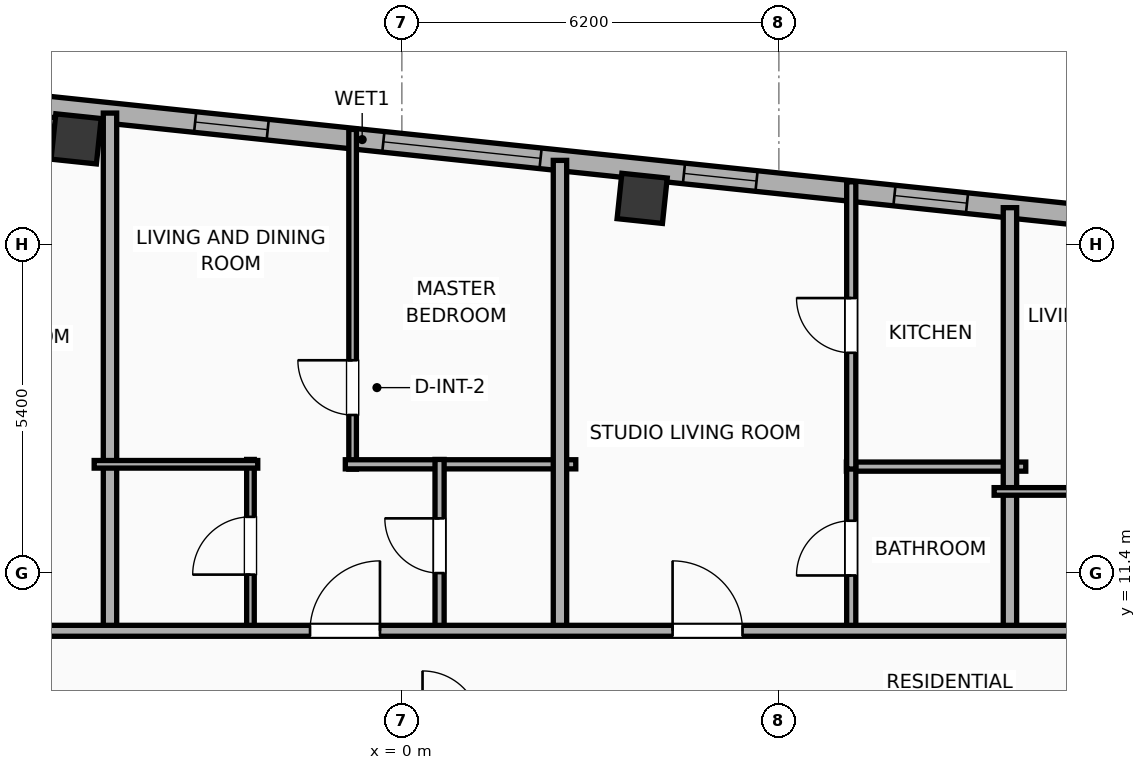
"""IFC4 building model, lengths in metres.
Left out: names, types, materials, properties, quantities, classifications, styles, units other than length and angle.
Written with IfcOpenShell. Run it as: python <this file> out.ifc"""

import sys

from ifc_helpers import new_model, si_unit, direction, frame, frame_2d, origin, origin_2d, place, context, subcontext, project, spatial, rectangle, hollow_rectangle, extrude, element, fill, save


model = new_model("IFC4")
c1 = context("Model", 3, precision=1e-05, world=origin(), true_north=direction((0.0, 1.0)))
c2 = subcontext(c1, "Body", "Model", "MODEL_VIEW")
j1 = project(units=[si_unit("LENGTHUNIT", "METRE"), si_unit("PLANEANGLEUNIT", "RADIAN")], contexts=[c1])
p1 = place(None, origin())
s1 = spatial("IfcSite", under=j1, at=p1, CompositionType="ELEMENT")
p2 = place(p1, origin())
s2 = spatial("IfcBuilding", under=s1, at=p2, CompositionType="ELEMENT")
p3 = place(p2, frame((0.0, 0.0, 306.8)))
s3 = spatial("IfcBuildingStorey", under=s2, at=p3, CompositionType="ELEMENT", Elevation=306.8)
for number, where, z_axis, x_axis in (
    (1, (3.952, 17.561, 0.0), (0.0, 0.0, 1.0), (0.995, -0.105, 0.0)),
    (2, (-5.357, 18.54, 0.0), (0.0, 0.0, 1.0), (0.995, -0.105, 0.0)),
):
    element("IfcColumn", number, at=place(p3, frame(where, z_axis=z_axis, x_axis=x_axis)), inside=s3, PredefinedType="COLUMN", context=c2, shape_type="SweptSolid", body=[
        extrude(hollow_rectangle(XDim=0.75, YDim=0.75, WallThickness=0.025, at=origin_2d()), origin(), (0.0, 0.0, 1.0), 3.865),
    ])
p4 = place(p3, frame((-23.908, 20.972, 0.0), z_axis=(0.0, 0.0, 1.0), x_axis=(0.994521888554, -0.104528528102, 0.0)))
e3 = element("IfcWall", 3, at=p4, inside=s3, PredefinedType="ELEMENTEDWALL", context=c2, shape_type="SweptSolid", body=[
    extrude(rectangle(XDim=46.766, YDim=0.34, at=frame_2d((23.383, 0.0))), origin(), (0.0, 0.0, 1.0), 2.39),
])
p5 = place(p4, frame((23.733, 0.0, 0.65)))
e4 = element("IfcOpeningElement", 4, at=p5, cuts=e3, PredefinedType="OPENING", context=c2, shape_type="SweptSolid", body=[
    extrude(rectangle(XDim=2.6, YDim=1.45, at=frame_2d((1.3, 0.725))), frame((0.0, 0.18, 0.0), z_axis=(0.0, -1.0, 0.0), x_axis=(1.0, 0.0, 0.0)), (0.0, 0.0, 1.0), 0.36),
])
p6 = place(p4, frame((38.522, 0.0, 0.65)))
e5 = element("IfcOpeningElement", 5, at=p6, cuts=e3, PredefinedType="OPENING", context=c2, shape_type="SweptSolid", body=[
    extrude(rectangle(XDim=2.6, YDim=1.45, at=frame_2d((1.3, 0.725))), frame((0.0, 0.18, 0.0), z_axis=(0.0, -1.0, 0.0), x_axis=(1.0, 0.0, 0.0)), (0.0, 0.0, 1.0), 0.36),
])
p7 = place(p4, frame((2.019, 0.0, 0.55)))
e6 = element("IfcOpeningElement", 6, at=p7, cuts=e3, PredefinedType="OPENING", context=c2, shape_type="SweptSolid", body=[
    extrude(rectangle(XDim=1.2, YDim=1.15, at=frame_2d((0.6, 0.575))), frame((0.0, 0.18, 0.0), z_axis=(0.0, -1.0, 0.0), x_axis=(1.0, 0.0, 0.0)), (0.0, 0.0, 1.0), 0.36),
])
p8 = place(p4, frame((9.966, 0.0, 0.55)))
e7 = element("IfcOpeningElement", 7, at=p8, cuts=e3, PredefinedType="OPENING", context=c2, shape_type="SweptSolid", body=[
    extrude(rectangle(XDim=1.2, YDim=1.15, at=frame_2d((0.6, 0.575))), frame((0.0, 0.18, 0.0), z_axis=(0.0, -1.0, 0.0), x_axis=(1.0, 0.0, 0.0)), (0.0, 0.0, 1.0), 0.36),
])
p9 = place(p4, frame((5.046, 0.0, 0.55)))
e8 = element("IfcOpeningElement", 8, at=p9, cuts=e3, PredefinedType="OPENING", context=c2, shape_type="SweptSolid", body=[
    extrude(rectangle(XDim=1.2, YDim=1.15, at=frame_2d((0.6, 0.575))), frame((0.0, 0.18, 0.0), z_axis=(0.0, -1.0, 0.0), x_axis=(1.0, 0.0, 0.0)), (0.0, 0.0, 1.0), 0.36),
])
p10 = place(p4, frame((16.207, 0.0, 0.55)))
e9 = element("IfcOpeningElement", 9, at=p10, cuts=e3, PredefinedType="OPENING", context=c2, shape_type="SweptSolid", body=[
    extrude(rectangle(XDim=1.2, YDim=1.15, at=frame_2d((0.6, 0.575))), frame((0.0, 0.18, 0.0), z_axis=(0.0, -1.0, 0.0), x_axis=(1.0, 0.0, 0.0)), (0.0, 0.0, 1.0), 0.36),
])
p11 = place(p4, frame((12.487, 0.0, 0.55)))
e10 = element("IfcOpeningElement", 10, at=p11, cuts=e3, PredefinedType="OPENING", context=c2, shape_type="SweptSolid", body=[
    extrude(rectangle(XDim=1.2, YDim=1.15, at=frame_2d((0.6, 0.575))), frame((0.0, 0.18, 0.0), z_axis=(0.0, -1.0, 0.0), x_axis=(1.0, 0.0, 0.0)), (0.0, 0.0, 1.0), 0.36),
])
p12 = place(p4, frame((20.621, 0.0, 0.55)))
e11 = element("IfcOpeningElement", 11, at=p12, cuts=e3, PredefinedType="OPENING", context=c2, shape_type="SweptSolid", body=[
    extrude(rectangle(XDim=1.2, YDim=1.15, at=frame_2d((0.6, 0.575))), frame((0.0, 0.18, 0.0), z_axis=(0.0, -1.0, 0.0), x_axis=(1.0, 0.0, 0.0)), (0.0, 0.0, 1.0), 0.36),
])
p13 = place(p4, frame((28.704, 0.0, 0.55)))
e12 = element("IfcOpeningElement", 12, at=p13, cuts=e3, PredefinedType="OPENING", context=c2, shape_type="SweptSolid", body=[
    extrude(rectangle(XDim=1.2, YDim=1.15, at=frame_2d((0.6, 0.575))), frame((0.0, 0.18, 0.0), z_axis=(0.0, -1.0, 0.0), x_axis=(1.0, 0.0, 0.0)), (0.0, 0.0, 1.0), 0.36),
])
p14 = place(p4, frame((32.185, 0.0, 0.55)))
e13 = element("IfcOpeningElement", 13, at=p14, cuts=e3, PredefinedType="OPENING", context=c2, shape_type="SweptSolid", body=[
    extrude(rectangle(XDim=1.2, YDim=1.15, at=frame_2d((0.6, 0.575))), frame((0.0, 0.18, 0.0), z_axis=(0.0, -1.0, 0.0), x_axis=(1.0, 0.0, 0.0)), (0.0, 0.0, 1.0), 0.36),
])
p15 = place(p4, frame((35.503, 0.0, 0.55)))
e14 = element("IfcOpeningElement", 14, at=p15, cuts=e3, PredefinedType="OPENING", context=c2, shape_type="SweptSolid", body=[
    extrude(rectangle(XDim=1.2, YDim=1.15, at=frame_2d((0.6, 0.575))), frame((0.0, 0.18, 0.0), z_axis=(0.0, -1.0, 0.0), x_axis=(1.0, 0.0, 0.0)), (0.0, 0.0, 1.0), 0.36),
])
p16 = place(p4, frame((43.106, 0.0, 0.55)))
e15 = element("IfcOpeningElement", 15, at=p16, cuts=e3, PredefinedType="OPENING", context=c2, shape_type="SweptSolid", body=[
    extrude(rectangle(XDim=1.2, YDim=1.15, at=frame_2d((0.6, 0.575))), frame((0.0, 0.18, 0.0), z_axis=(0.0, -1.0, 0.0), x_axis=(1.0, 0.0, 0.0)), (0.0, 0.0, 1.0), 0.36),
])
p17 = place(p3, frame((-4.8, 10.37, 0.0), z_axis=(0.0, 0.0, 1.0), x_axis=(0.0, 1.0, 0.0)))
e16 = element("IfcWall", 16, at=p17, inside=s3, PredefinedType="PARTITIONING", context=c2, shape_type="SweptSolid", body=[
    extrude(rectangle(XDim=8.594, YDim=0.22, at=frame_2d((4.297, 0.0))), origin(), (0.0, 0.0, 1.0), 2.39),
])
p18 = place(p3, frame((-0.81, 13.108, 0.0), z_axis=(0.0, 0.0, 1.0), x_axis=(0.0, 1.0, 0.0)))
e17 = element("IfcWall", 17, at=p18, inside=s3, PredefinedType="PARTITIONING", context=c2, shape_type="SweptSolid", body=[
    extrude(rectangle(XDim=5.587, YDim=0.125, at=frame_2d((2.794, 0.0))), origin(), (0.0, 0.0, 1.0), 3.5),
])
p19 = place(p18, frame((0.891, 0.0, 0.0)))
e18 = element("IfcOpeningElement", 18, at=p19, cuts=e17, PredefinedType="OPENING", context=c2, shape_type="SweptSolid", body=[
    extrude(rectangle(XDim=0.9, YDim=2.05, at=frame_2d((0.45, 1.025))), frame((0.0, 0.073, 0.0), z_axis=(0.0, -1.0, 0.0), x_axis=(1.0, 0.0, 0.0)), (0.0, 0.0, 1.0), 0.145),
])
p20 = place(p3, frame((-0.93, 13.188, 0.0), z_axis=(0.0, 0.0, 1.0), x_axis=(1.0, 0.0, 0.0)))
e19 = element("IfcWall", 19, at=p20, inside=s3, PredefinedType="PLUMBINGWALL", context=c2, shape_type="SweptSolid", body=[
    extrude(rectangle(XDim=3.79, YDim=0.15, at=frame_2d((1.895, 0.0))), origin(), (0.0, 0.0, 1.0), 3.5),
])
p21 = place(p3, frame((-2.49, 10.43, 0.0), z_axis=(0.0, 0.0, 1.0), x_axis=(0.0, 1.0, 0.0)))
e20 = element("IfcWall", 20, at=p21, inside=s3, PredefinedType="PARTITIONING", context=c2, shape_type="SweptSolid", body=[
    extrude(rectangle(XDim=2.838, YDim=0.125, at=frame_2d((1.419, 0.0))), origin(), (0.0, 0.0, 1.0), 3.5),
])
p22 = place(p21, frame((0.944, 0.0, 0.0)))
e21 = element("IfcOpeningElement", 21, at=p22, cuts=e20, PredefinedType="OPENING", context=c2, shape_type="SweptSolid", body=[
    extrude(rectangle(XDim=0.95, YDim=2.05, at=frame_2d((0.475, 1.025))), frame((0.0, 0.073, 0.0), z_axis=(0.0, -1.0, 0.0), x_axis=(1.0, 0.0, 0.0)), (0.0, 0.0, 1.0), 0.145),
])
p23 = place(p3, frame((-5.06, 13.188, 0.0), z_axis=(0.0, 0.0, 1.0), x_axis=(1.0, 0.0, 0.0)))
e22 = element("IfcWall", 22, at=p23, inside=s3, PredefinedType="PARTITIONING", context=c2, shape_type="SweptSolid", body=[
    extrude(rectangle(XDim=2.69, YDim=0.125, at=frame_2d((1.345, 0.0))), origin(), (0.0, 0.0, 1.0), 3.5),
])
p24 = place(p3, frame((0.62, 10.43, 0.0), z_axis=(0.0, 0.0, 1.0), x_axis=(0.0, 1.0, 0.0)))
e23 = element("IfcWall", 23, at=p24, inside=s3, PredefinedType="PLUMBINGWALL", context=c2, shape_type="SweptSolid", body=[
    extrude(rectangle(XDim=2.838, YDim=0.15, at=frame_2d((1.419, 0.0))), origin(), (0.0, 0.0, 1.0), 3.5),
])
p25 = place(p24, frame((0.969, 0.0, 0.0)))
e24 = element("IfcOpeningElement", 24, at=p25, cuts=e23, PredefinedType="OPENING", context=c2, shape_type="SweptSolid", body=[
    extrude(rectangle(XDim=0.9, YDim=2.05, at=frame_2d((0.45, 1.025))), frame((0.0, 0.085, 0.0), z_axis=(0.0, -1.0, 0.0), x_axis=(1.0, 0.0, 0.0)), (0.0, 0.0, 1.0), 0.17),
])
p26 = place(p3, frame((2.6, 10.37, 0.0), z_axis=(0.0, 0.0, 1.0), x_axis=(0.0, 1.0, 0.0)))
e25 = element("IfcWall", 25, at=p26, inside=s3, PredefinedType="PARTITIONING", context=c2, shape_type="SweptSolid", body=[
    extrude(rectangle(XDim=7.816, YDim=0.22, at=frame_2d((3.908, 0.0))), origin(), (0.0, 0.0, 1.0), 3.5),
])
p27 = place(p3, frame((7.31, 13.15, 0.0), z_axis=(0.0, 0.0, 1.0), x_axis=(1.0, 0.0, 0.0)))
e26 = element("IfcWall", 26, at=p27, inside=s3, PredefinedType="PLUMBINGWALL", context=c2, shape_type="SweptSolid", body=[
    extrude(rectangle(XDim=2.95, YDim=0.15, at=frame_2d((1.475, 0.0))), origin(), (0.0, 0.0, 1.0), 3.5),
])
p28 = place(p3, frame((7.39, 10.43, 0.0), z_axis=(0.0, 0.0, 1.0), x_axis=(0.0, 1.0, 0.0)))
e27 = element("IfcWall", 27, at=p28, inside=s3, PredefinedType="PLUMBINGWALL", context=c2, shape_type="SweptSolid", body=[
    extrude(rectangle(XDim=2.76, YDim=0.15, at=frame_2d((1.38, 0.0))), origin(), (0.0, 0.0, 1.0), 3.5),
])
p29 = place(p28, frame((0.93, 0.0, 0.0)))
e28 = element("IfcOpeningElement", 28, at=p29, cuts=e27, PredefinedType="OPENING", context=c2, shape_type="SweptSolid", body=[
    extrude(rectangle(XDim=0.9, YDim=2.05, at=frame_2d((0.45, 1.025))), frame((0.0, 0.085, 0.0), z_axis=(0.0, -1.0, 0.0), x_axis=(1.0, 0.0, 0.0)), (0.0, 0.0, 1.0), 0.17),
])
p30 = place(p3, frame((7.39, 13.11, 0.0), z_axis=(0.0, 0.0, 1.0), x_axis=(0.0, 1.0, 0.0)))
e29 = element("IfcWall", 29, at=p30, inside=s3, PredefinedType="PLUMBINGWALL", context=c2, shape_type="SweptSolid", body=[
    extrude(rectangle(XDim=4.723, YDim=0.15, at=frame_2d((2.362, 0.0))), origin(), (0.0, 0.0, 1.0), 3.5),
])
p31 = place(p30, frame((1.912, 0.0, 0.0)))
e30 = element("IfcOpeningElement", 30, at=p31, cuts=e29, PredefinedType="OPENING", context=c2, shape_type="SweptSolid", body=[
    extrude(rectangle(XDim=0.9, YDim=2.05, at=frame_2d((0.45, 1.025))), frame((0.0, 0.085, 0.0), z_axis=(0.0, -1.0, 0.0), x_axis=(1.0, 0.0, 0.0)), (0.0, 0.0, 1.0), 0.17),
])
p32 = place(p3, frame((10.0, 10.37, 0.0), z_axis=(0.0, 0.0, 1.0), x_axis=(0.0, 1.0, 0.0)))
e31 = element("IfcWall", 31, at=p32, inside=s3, PredefinedType="PARTITIONING", context=c2, shape_type="SweptSolid", body=[
    extrude(rectangle(XDim=7.038, YDim=0.22, at=frame_2d((3.519, 0.0))), origin(), (0.0, 0.0, 1.0), 3.5),
])
p33 = place(p3, frame((9.74, 12.742, 0.0), z_axis=(0.0, 0.0, 1.0), x_axis=(1.0, 0.0, 0.0)))
e32 = element("IfcWall", 32, at=p33, inside=s3, PredefinedType="PARTITIONING", context=c2, shape_type="SweptSolid", body=[
    extrude(rectangle(XDim=2.69, YDim=0.125, at=frame_2d((1.345, 0.0))), origin(), (0.0, 0.0, 1.0), 3.5),
])
p34 = place(p3, frame((-28.479, 10.45, 0.0), z_axis=(0.0, 0.0, 1.0), x_axis=(1.0, 0.0, 0.0)))
e33 = element("IfcWall", 33, at=p34, inside=s3, PredefinedType="PARTITIONING", context=c2, shape_type="SweptSolid", body=[
    extrude(rectangle(XDim=53.956, YDim=0.18, at=frame_2d((26.978, 0.0))), origin(), (0.0, 0.0, 1.0), 3.5),
])
p35 = place(p34, frame((4.065, 0.0, 0.0)))
e34 = element("IfcOpeningElement", 34, at=p35, cuts=e33, PredefinedType="OPENING", context=c2, shape_type="SweptSolid", body=[
    extrude(rectangle(XDim=1.15, YDim=2.05, at=frame_2d((0.575, 1.025))), frame((0.0, 0.1, 0.0), z_axis=(0.0, -1.0, 0.0), x_axis=(1.0, 0.0, 0.0)), (0.0, 0.0, 1.0), 0.2),
])
p36 = place(p34, frame((13.281, 0.0, 0.0)))
e35 = element("IfcOpeningElement", 35, at=p36, cuts=e33, PredefinedType="OPENING", context=c2, shape_type="SweptSolid", body=[
    extrude(rectangle(XDim=1.15, YDim=2.05, at=frame_2d((0.575, 1.025))), frame((0.0, 0.1, 0.0), z_axis=(0.0, -1.0, 0.0), x_axis=(1.0, 0.0, 0.0)), (0.0, 0.0, 1.0), 0.2),
])
p37 = place(p34, frame((20.678, 0.0, 0.0)))
e36 = element("IfcOpeningElement", 36, at=p37, cuts=e33, PredefinedType="OPENING", context=c2, shape_type="SweptSolid", body=[
    extrude(rectangle(XDim=1.15, YDim=2.05, at=frame_2d((0.575, 1.025))), frame((0.0, 0.1, 0.0), z_axis=(0.0, -1.0, 0.0), x_axis=(1.0, 0.0, 0.0)), (0.0, 0.0, 1.0), 0.2),
])
p38 = place(p34, frame((26.969, 0.0, 0.0)))
e37 = element("IfcOpeningElement", 37, at=p38, cuts=e33, PredefinedType="OPENING", context=c2, shape_type="SweptSolid", body=[
    extrude(rectangle(XDim=1.15, YDim=2.05, at=frame_2d((0.575, 1.025))), frame((0.0, 0.1, 0.0), z_axis=(0.0, -1.0, 0.0), x_axis=(1.0, 0.0, 0.0)), (0.0, 0.0, 1.0), 0.2),
])
p39 = place(p34, frame((32.931, 0.0, 0.0)))
e38 = element("IfcOpeningElement", 38, at=p39, cuts=e33, PredefinedType="OPENING", context=c2, shape_type="SweptSolid", body=[
    extrude(rectangle(XDim=1.15, YDim=2.05, at=frame_2d((0.575, 1.025))), frame((0.0, 0.1, 0.0), z_axis=(0.0, -1.0, 0.0), x_axis=(1.0, 0.0, 0.0)), (0.0, 0.0, 1.0), 0.2),
])
p40 = place(p34, frame((41.769, 0.0, 0.0)))
e39 = element("IfcOpeningElement", 39, at=p40, cuts=e33, PredefinedType="OPENING", context=c2, shape_type="SweptSolid", body=[
    extrude(rectangle(XDim=1.15, YDim=2.05, at=frame_2d((0.575, 1.025))), frame((0.0, 0.1, 0.0), z_axis=(0.0, -1.0, 0.0), x_axis=(1.0, 0.0, 0.0)), (0.0, 0.0, 1.0), 0.2),
])
p41 = place(p34, frame((49.761, 0.0, 0.0)))
e40 = element("IfcOpeningElement", 40, at=p41, cuts=e33, PredefinedType="OPENING", context=c2, shape_type="SweptSolid", body=[
    extrude(rectangle(XDim=0.9, YDim=2.05, at=frame_2d((0.45, 1.025))), frame((0.0, 0.1, 0.0), z_axis=(0.0, -1.0, 0.0), x_axis=(1.0, 0.0, 0.0)), (0.0, 0.0, 1.0), 0.2),
])
p42 = place(p5, origin())
e41 = element("IfcWindow", 41, at=p42, inside=s3, PartitioningType="SINGLE_PANEL", PredefinedType="WINDOW", context=c2, shape_type="SweptSolid", body=[
    extrude(rectangle(XDim=2.6, YDim=1.45, at=frame_2d((1.3, 0.725))), frame((0.0, 0.03, 0.0), z_axis=(0.0, -1.0, 0.0), x_axis=(1.0, 0.0, 0.0)), (0.0, 0.0, 1.0), 0.06),
])
fill(e4, e41)
p43 = place(p12, origin())
e42 = element("IfcWindow", 42, at=p43, inside=s3, PartitioningType="SINGLE_PANEL", PredefinedType="WINDOW", context=c2, shape_type="SweptSolid", body=[
    extrude(rectangle(XDim=1.2, YDim=1.15, at=frame_2d((0.6, 0.575))), frame((0.0, 0.03, 0.0), z_axis=(0.0, -1.0, 0.0), x_axis=(1.0, 0.0, 0.0)), (0.0, 0.0, 1.0), 0.06),
])
fill(e11, e42)
p44 = place(p13, origin())
e43 = element("IfcWindow", 43, at=p44, inside=s3, PartitioningType="SINGLE_PANEL", PredefinedType="WINDOW", context=c2, shape_type="SweptSolid", body=[
    extrude(rectangle(XDim=1.2, YDim=1.15, at=frame_2d((0.6, 0.575))), frame((0.0, 0.03, 0.0), z_axis=(0.0, -1.0, 0.0), x_axis=(1.0, 0.0, 0.0)), (0.0, 0.0, 1.0), 0.06),
])
fill(e12, e43)
p45 = place(p14, origin())
e44 = element("IfcWindow", 44, at=p45, inside=s3, PartitioningType="SINGLE_PANEL", PredefinedType="WINDOW", context=c2, shape_type="SweptSolid", body=[
    extrude(rectangle(XDim=1.2, YDim=1.15, at=frame_2d((0.6, 0.575))), frame((0.0, 0.03, 0.0), z_axis=(0.0, -1.0, 0.0), x_axis=(1.0, 0.0, 0.0)), (0.0, 0.0, 1.0), 0.06),
])
fill(e13, e44)
p46 = place(p19, origin())
e45 = element("IfcDoor", 45, at=p46, inside=s3, OperationType="SINGLE_SWING_RIGHT", PredefinedType="DOOR", context=c2, shape_type="SweptSolid", body=[
    extrude(rectangle(XDim=0.9, YDim=2.05, at=frame_2d((0.45, 1.025))), frame((0.0, 0.025, 0.0), z_axis=(0.0, -1.0, 0.0), x_axis=(1.0, 0.0, 0.0)), (0.0, 0.0, 1.0), 0.05),
])
fill(e18, e45)
p47 = place(p22, origin())
e46 = element("IfcDoor", 46, at=p47, inside=s3, OperationType="SINGLE_SWING_LEFT", PredefinedType="DOOR", context=c2, shape_type="SweptSolid", body=[
    extrude(rectangle(XDim=0.95, YDim=2.05, at=frame_2d((0.475, 1.025))), frame((0.0, 0.025, 0.0), z_axis=(0.0, -1.0, 0.0), x_axis=(1.0, 0.0, 0.0)), (0.0, 0.0, 1.0), 0.05),
])
fill(e21, e46)
p48 = place(p25, origin())
e47 = element("IfcDoor", 47, at=p48, inside=s3, OperationType="SINGLE_SWING_RIGHT", PredefinedType="DOOR", context=c2, shape_type="SweptSolid", body=[
    extrude(rectangle(XDim=0.9, YDim=2.05, at=frame_2d((0.45, 1.025))), frame((0.0, 0.025, 0.0), z_axis=(0.0, -1.0, 0.0), x_axis=(1.0, 0.0, 0.0)), (0.0, 0.0, 1.0), 0.05),
])
fill(e24, e47)
p49 = place(p29, origin())
e48 = element("IfcDoor", 48, at=p49, inside=s3, OperationType="SINGLE_SWING_LEFT", PredefinedType="DOOR", context=c2, shape_type="SweptSolid", body=[
    extrude(rectangle(XDim=0.9, YDim=2.05, at=frame_2d((0.45, 1.025))), frame((0.0, 0.025, 0.0), z_axis=(0.0, -1.0, 0.0), x_axis=(1.0, 0.0, 0.0)), (0.0, 0.0, 1.0), 0.05),
])
fill(e28, e48)
p50 = place(p31, origin())
e49 = element("IfcDoor", 49, at=p50, inside=s3, OperationType="SINGLE_SWING_RIGHT", PredefinedType="DOOR", context=c2, shape_type="SweptSolid", body=[
    extrude(rectangle(XDim=0.9, YDim=2.05, at=frame_2d((0.45, 1.025))), frame((0.0, 0.025, 0.0), z_axis=(0.0, -1.0, 0.0), x_axis=(1.0, 0.0, 0.0)), (0.0, 0.0, 1.0), 0.05),
])
fill(e30, e49)
p51 = place(p38, origin())
e50 = element("IfcDoor", 50, at=p51, inside=s3, OperationType="SINGLE_SWING_RIGHT", PredefinedType="DOOR", context=c2, shape_type="SweptSolid", body=[
    extrude(rectangle(XDim=1.15, YDim=2.05, at=frame_2d((0.575, 1.025))), frame((0.0, 0.025, 0.0), z_axis=(0.0, -1.0, 0.0), x_axis=(1.0, 0.0, 0.0)), (0.0, 0.0, 1.0), 0.05),
])
fill(e37, e50)
p52 = place(p39, origin())
e51 = element("IfcDoor", 51, at=p52, inside=s3, OperationType="SINGLE_SWING_LEFT", PredefinedType="DOOR", context=c2, shape_type="SweptSolid", body=[
    extrude(rectangle(XDim=1.15, YDim=2.05, at=frame_2d((0.575, 1.025))), frame((0.0, 0.025, 0.0), z_axis=(0.0, -1.0, 0.0), x_axis=(1.0, 0.0, 0.0)), (0.0, 0.0, 1.0), 0.05),
])
fill(e38, e51)
save(model, sys.argv[1])
